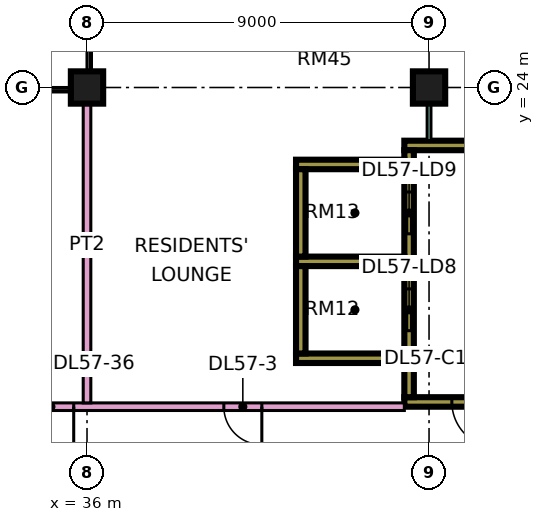
"""IFC4 building model, lengths in metres.
Left out: names, types, materials, properties, quantities, classifications, styles, units other than length and angle.
Written with IfcOpenShell. Run it as: python <this file> out.ifc"""

import sys

from ifc_helpers import new_model, si_unit, direction, frame, frame_2d, origin, origin_2d, place, context, subcontext, project, spatial, rectangle, extrude, element, fill, save


model = new_model("IFC4")
c1 = context("Model", 3, precision=1e-05, world=origin(), true_north=direction((0.0, 1.0)))
c2 = subcontext(c1, "Body", "Model", "MODEL_VIEW")
j1 = project(units=[si_unit("LENGTHUNIT", "METRE"), si_unit("PLANEANGLEUNIT", "RADIAN")], contexts=[c1])
p1 = place(None, origin())
s1 = spatial("IfcSite", under=j1, at=p1, CompositionType="ELEMENT")
p2 = place(p1, origin())
s2 = spatial("IfcBuilding", under=s1, at=p2, CompositionType="ELEMENT")
p3 = place(p2, frame((0.0, 0.0, 241.65)))
s3 = spatial("IfcBuildingStorey", under=s2, at=p3, CompositionType="ELEMENT", Elevation=241.65)
for number, where, z_axis, x_axis in (
    (1, (36.0, 24.0, 0.0), (0.0, 0.0, 1.0), (1.0, 0.0, 0.0)),
    (2, (45.0, 24.0, 0.0), (0.0, 0.0, 1.0), (1.0, 0.0, 0.0)),
):
    element("IfcColumn", number, at=place(p3, frame(where, z_axis=z_axis, x_axis=x_axis)), inside=s3, PredefinedType="COLUMN", context=c2, shape_type="SweptSolid", body=[
        extrude(rectangle(XDim=0.85, YDim=0.85, at=origin_2d()), origin(), (0.0, 0.0, 1.0), 3.75),
    ])
p4 = place(p3, frame((44.35, 15.725, 0.0), z_axis=(0.0, 0.0, 1.0), x_axis=(1.0, 0.0, 0.0)))
e3 = element("IfcWall", 3, at=p4, inside=s3, PredefinedType="SHEAR", context=c2, shape_type="SweptSolid", body=[
    extrude(rectangle(XDim=3.425, YDim=0.25, at=frame_2d((1.712, 0.0))), origin(), (0.0, 0.0, 1.0), 3.75),
])
p5 = place(p4, frame((1.25, 0.0, 0.0)))
e4 = element("IfcOpeningElement", 4, at=p5, cuts=e3, PredefinedType="OPENING", context=c2, shape_type="SweptSolid", body=[
    extrude(rectangle(XDim=1.2, YDim=2.2, at=frame_2d((0.6, 1.1))), frame((0.0, 0.135, 0.0), z_axis=(0.0, -1.0, 0.0), x_axis=(1.0, 0.0, 0.0)), (0.0, 0.0, 1.0), 0.27),
])
p6 = place(p3, frame((44.35, 22.475, 0.0), z_axis=(0.0, 0.0, 1.0), x_axis=(1.0, 0.0, 0.0)))
e5 = element("IfcWall", 5, at=p6, inside=s3, PredefinedType="SHEAR", context=c2, shape_type="SweptSolid", body=[
    extrude(rectangle(XDim=3.425, YDim=0.25, at=frame_2d((1.712, 0.0))), origin(), (0.0, 0.0, 1.0), 3.75),
])
p7 = place(p3, frame((44.475, 15.85, 0.0), z_axis=(0.0, 0.0, 1.0), x_axis=(0.0, 1.0, 0.0)))
e6 = element("IfcWall", 6, at=p7, inside=s3, PredefinedType="SHEAR", context=c2, shape_type="SweptSolid", body=[
    extrude(rectangle(XDim=6.5, YDim=0.25, at=frame_2d((3.25, 0.0))), origin(), (0.0, 0.0, 1.0), 3.75),
])
p8 = place(p7, frame((1.75, 0.0, 0.0)))
e7 = element("IfcOpeningElement", 7, at=p8, cuts=e6, PredefinedType="OPENING", context=c2, shape_type="SweptSolid", body=[
    extrude(rectangle(XDim=1.1, YDim=2.2, at=frame_2d((0.55, 1.1))), frame((0.0, 0.135, 0.0), z_axis=(0.0, -1.0, 0.0), x_axis=(1.0, 0.0, 0.0)), (0.0, 0.0, 1.0), 0.27),
])
p9 = place(p7, frame((4.3, 0.0, 0.0)))
e8 = element("IfcOpeningElement", 8, at=p9, cuts=e6, PredefinedType="OPENING", context=c2, shape_type="SweptSolid", body=[
    extrude(rectangle(XDim=1.1, YDim=2.2, at=frame_2d((0.55, 1.1))), frame((0.0, 0.135, 0.0), z_axis=(0.0, -1.0, 0.0), x_axis=(1.0, 0.0, 0.0)), (0.0, 0.0, 1.0), 0.27),
])
for number, where, z_axis, x_axis in (
    (9, (41.5, 16.875, 0.0), (0.0, 0.0, 1.0), (1.0, 0.0, 0.0)),
    (10, (41.5, 19.425, 0.0), (0.0, 0.0, 1.0), (1.0, 0.0, 0.0)),
    (11, (41.5, 21.975, 0.0), (0.0, 0.0, 1.0), (1.0, 0.0, 0.0)),
):
    element("IfcWall", number, at=place(p3, frame(where, z_axis=z_axis, x_axis=x_axis)), inside=s3, PredefinedType="SHEAR", context=c2, shape_type="SweptSolid", body=[
        extrude(rectangle(XDim=2.85, YDim=0.25, at=frame_2d((1.425, 0.0))), origin(), (0.0, 0.0, 1.0), 3.75),
    ])
for number, where, z_axis, x_axis in (
    (12, (41.625, 17.0, 0.0), (0.0, 0.0, 1.0), (0.0, 1.0, 0.0)),
    (13, (41.625, 19.55, 0.0), (0.0, 0.0, 1.0), (0.0, 1.0, 0.0)),
):
    element("IfcWall", number, at=place(p3, frame(where, z_axis=z_axis, x_axis=x_axis)), inside=s3, PredefinedType="SHEAR", context=c2, shape_type="SweptSolid", body=[
        extrude(rectangle(XDim=2.3, YDim=0.25, at=frame_2d((1.15, 0.0))), origin(), (0.0, 0.0, 1.0), 3.75),
    ])
p10 = place(p3, frame((34.0, 15.6, 0.0), z_axis=(0.0, 0.0, 1.0), x_axis=(1.0, 0.0, 0.0)))
e14 = element("IfcWall", 14, at=p10, inside=s3, PredefinedType="PARTITIONING", context=c2, shape_type="SweptSolid", body=[
    extrude(rectangle(XDim=10.35, YDim=0.2, at=frame_2d((5.175, 0.0))), origin(), (0.0, 0.0, 1.0), 3.35),
])
p11 = place(p10, frame((5.6, 0.0, 0.0)))
e15 = element("IfcOpeningElement", 15, at=p11, cuts=e14, PredefinedType="OPENING", context=c2, shape_type="SweptSolid", body=[
    extrude(rectangle(XDim=1.0, YDim=2.1, at=frame_2d((0.5, 1.05))), frame((0.0, 0.11, 0.0), z_axis=(0.0, -1.0, 0.0), x_axis=(1.0, 0.0, 0.0)), (0.0, 0.0, 1.0), 0.22),
])
p12 = place(p10, frame((0.45, 0.0, 0.0)))
e16 = element("IfcOpeningElement", 16, at=p12, cuts=e14, PredefinedType="OPENING", context=c2, shape_type="SweptSolid", body=[
    extrude(rectangle(XDim=1.2, YDim=2.1, at=frame_2d((0.6, 1.05))), frame((0.0, 0.11, 0.0), z_axis=(0.0, -1.0, 0.0), x_axis=(1.0, 0.0, 0.0)), (0.0, 0.0, 1.0), 0.22),
])
p13 = place(p3, frame((36.0, 15.7, 0.0), z_axis=(0.0, 0.0, 1.0), x_axis=(0.0, 1.0, 0.0)))
e17 = element("IfcWall", 17, at=p13, inside=s3, PredefinedType="PARTITIONING", context=c2, shape_type="SweptSolid", body=[
    extrude(rectangle(XDim=8.3, YDim=0.2, at=frame_2d((4.15, 0.0))), origin(), (0.0, 0.0, 1.0), 3.35),
])
p14 = place(p3, frame((45.0, 22.6, 0.0), z_axis=(0.0, 0.0, 1.0), x_axis=(0.0, 1.0, 0.0)))
e18 = element("IfcWall", 18, at=p14, inside=s3, PredefinedType="PARTITIONING", context=c2, shape_type="SweptSolid", body=[
    extrude(rectangle(XDim=1.4, YDim=0.1, at=frame_2d((0.7, 0.0))), origin(), (0.0, 0.0, 1.0), 3.35),
])
p15 = place(p5, origin())
e19 = element("IfcDoor", 19, at=p15, inside=s3, OperationType="SINGLE_SWING_RIGHT", PredefinedType="DOOR", context=c2, shape_type="SweptSolid", body=[
    extrude(rectangle(XDim=1.2, YDim=2.2, at=frame_2d((0.6, 1.1))), frame((0.0, 0.025, 0.0), z_axis=(0.0, -1.0, 0.0), x_axis=(1.0, 0.0, 0.0)), (0.0, 0.0, 1.0), 0.05),
])
fill(e4, e19)
p16 = place(p8, origin())
e20 = element("IfcDoor", 20, at=p16, inside=s3, OperationType="DOUBLE_DOOR_SLIDING", PredefinedType="DOOR", context=c2, shape_type="SweptSolid", body=[
    extrude(rectangle(XDim=1.1, YDim=2.2, at=frame_2d((0.55, 1.1))), frame((0.0, 0.025, 0.0), z_axis=(0.0, -1.0, 0.0), x_axis=(1.0, 0.0, 0.0)), (0.0, 0.0, 1.0), 0.05),
])
fill(e7, e20)
p17 = place(p9, origin())
e21 = element("IfcDoor", 21, at=p17, inside=s3, OperationType="DOUBLE_DOOR_SLIDING", PredefinedType="DOOR", context=c2, shape_type="SweptSolid", body=[
    extrude(rectangle(XDim=1.1, YDim=2.2, at=frame_2d((0.55, 1.1))), frame((0.0, 0.025, 0.0), z_axis=(0.0, -1.0, 0.0), x_axis=(1.0, 0.0, 0.0)), (0.0, 0.0, 1.0), 0.05),
])
fill(e8, e21)
p18 = place(p11, origin())
e22 = element("IfcDoor", 22, at=p18, inside=s3, OperationType="SINGLE_SWING_RIGHT", PredefinedType="DOOR", context=c2, shape_type="SweptSolid", body=[
    extrude(rectangle(XDim=1.0, YDim=2.1, at=frame_2d((0.5, 1.05))), frame((0.0, 0.025, 0.0), z_axis=(0.0, -1.0, 0.0), x_axis=(1.0, 0.0, 0.0)), (0.0, 0.0, 1.0), 0.05),
])
fill(e15, e22)
p19 = place(p12, origin())
e23 = element("IfcDoor", 23, at=p19, inside=s3, OperationType="SINGLE_SWING_RIGHT", PredefinedType="DOOR", context=c2, shape_type="SweptSolid", body=[
    extrude(rectangle(XDim=1.2, YDim=2.1, at=frame_2d((0.6, 1.05))), frame((0.0, 0.025, 0.0), z_axis=(0.0, -1.0, 0.0), x_axis=(1.0, 0.0, 0.0)), (0.0, 0.0, 1.0), 0.05),
])
fill(e16, e23)
save(model, sys.argv[1])
